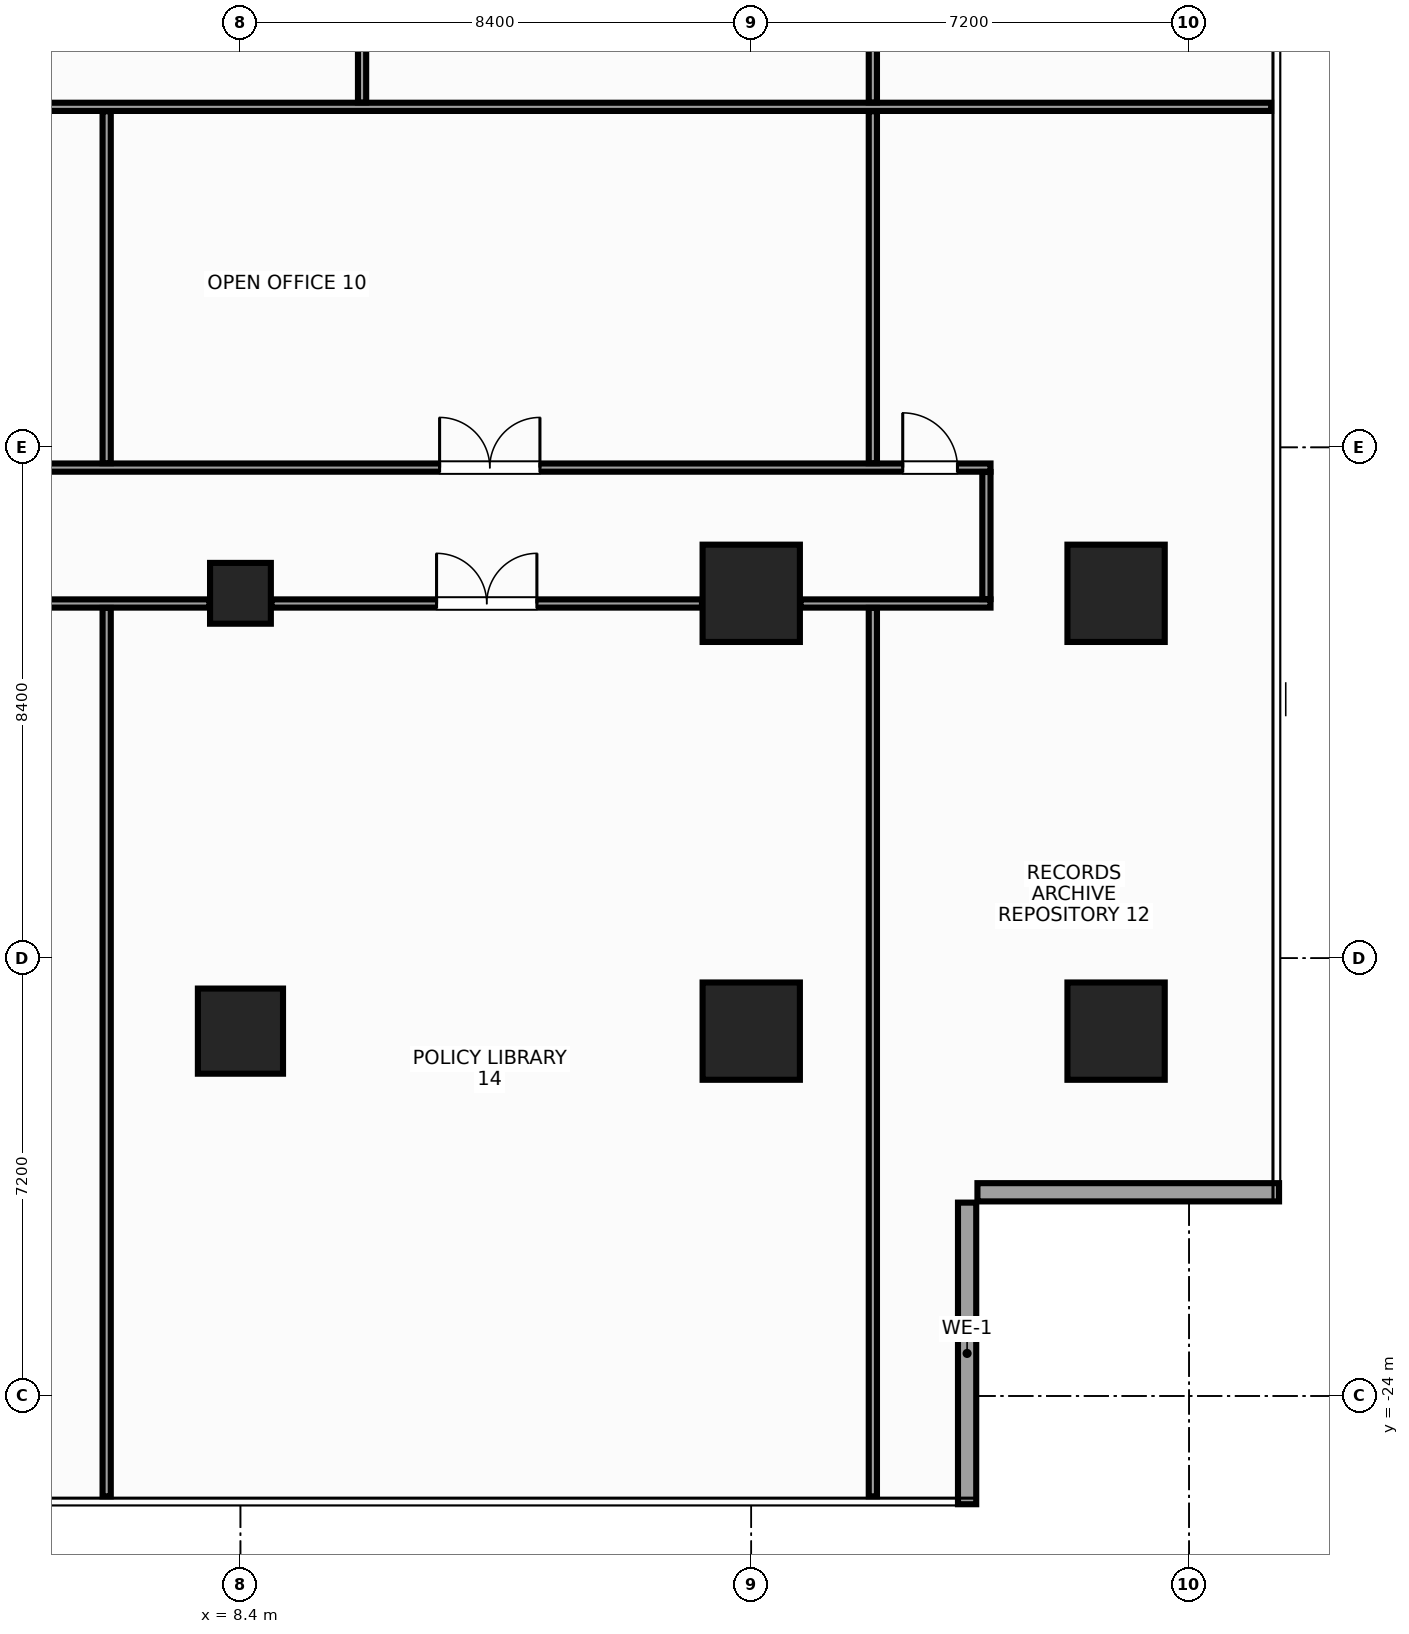
"""IFC4 building model, lengths in metres.
Left out: names, types, materials, properties, quantities, classifications, styles, units other than length and angle.
Written with IfcOpenShell. Run it as: python <this file> out.ifc"""

import sys

from ifc_helpers import new_model, si_unit, direction, frame, frame_2d, origin, origin_2d, place, context, subcontext, project, spatial, rectangle, hollow_rectangle, extrude, source, transform, mapped, element, fill, save


model = new_model("IFC4")
c1 = context("Model", 3, precision=1e-05, world=origin(), true_north=direction((0.0, 1.0)))
c2 = subcontext(c1, "Body", "Model", "MODEL_VIEW")
j1 = project(units=[si_unit("LENGTHUNIT", "METRE"), si_unit("PLANEANGLEUNIT", "RADIAN")], contexts=[c1])
p1 = place(None, origin())
s1 = spatial("IfcSite", under=j1, at=p1, CompositionType="ELEMENT")
p2 = place(p1, origin())
s2 = spatial("IfcBuilding", under=s1, at=p2, CompositionType="ELEMENT")
p3 = place(p2, frame((0.0, 0.0, 77.6)))
s3 = spatial("IfcBuildingStorey", under=s2, at=p3, CompositionType="ELEMENT", Elevation=77.6)
m1 = source(origin(), c2, "Body", "SweptSolid", [
    extrude(rectangle(XDim=1.6, YDim=1.6, at=origin_2d()), origin(), (0.0, 0.0, 1.0), 3.6),
])
for number, where, z_axis, x_axis in (
    (1, (16.8, -18.0, 0.0), (0.0, 0.0, 1.0), (1.0, 0.0, 0.0)),
    (2, (16.8, -10.8, 0.0), (0.0, 0.0, 1.0), (1.0, 0.0, 0.0)),
    (3, (22.8, -18.0, 0.0), (0.0, 0.0, 1.0), (1.0, 0.0, 0.0)),
    (4, (22.8, -10.8, 0.0), (0.0, 0.0, 1.0), (1.0, 0.0, 0.0)),
):
    element("IfcColumn", number, at=place(p3, frame(where, z_axis=z_axis, x_axis=x_axis)), inside=s3, PredefinedType="COLUMN", context=c2, shape_type="MappedRepresentation", body=[
        mapped(m1, transform((0.0, 0.0, 0.0), x_axis=(1.0, 0.0, 0.0), y_axis=(0.0, 1.0, 0.0), z_axis=(0.0, 0.0, 1.0), scale=1.0)),
    ])
m2 = source(origin(), c2, "Body", "SweptSolid", [
    extrude(rectangle(XDim=1.4, YDim=1.4, at=origin_2d()), origin(), (0.0, 0.0, 1.0), 3.6),
])
p4 = place(p3, frame((8.4, -18.0, 0.0), z_axis=(0.0, 0.0, 1.0), x_axis=(1.0, 0.0, 0.0)))
e5 = element("IfcColumn", 5, at=p4, inside=s3, PredefinedType="COLUMN", context=c2, shape_type="MappedRepresentation", body=[
    mapped(m2, transform((0.0, 0.0, 0.0), x_axis=(1.0, 0.0, 0.0), y_axis=(0.0, 1.0, 0.0), z_axis=(0.0, 0.0, 1.0), scale=1.0)),
])
m3 = source(origin(), c2, "Body", "SweptSolid", [
    extrude(hollow_rectangle(XDim=1.0, YDim=1.0, WallThickness=0.045, at=origin_2d()), origin(), (0.0, 0.0, 1.0), 3.6),
])
p5 = place(p3, frame((8.4, -10.8, 0.0), z_axis=(0.0, 0.0, 1.0), x_axis=(1.0, 0.0, 0.0)))
e6 = element("IfcColumn", 6, at=p5, inside=s3, PredefinedType="COLUMN", context=c2, shape_type="MappedRepresentation", body=[
    mapped(m3, transform((0.0, 0.0, 0.0), x_axis=(1.0, 0.0, 0.0), y_axis=(0.0, 1.0, 0.0), z_axis=(0.0, 0.0, 1.0), scale=1.0)),
])
m4 = source(origin(), c2, "Body", "SweptSolid", [
    extrude(rectangle(XDim=4.96, YDim=0.3, at=frame_2d((2.48, 0.0))), origin(), (0.0, 0.0, 1.0), 2.74),
])
for number, where, z_axis, x_axis in (
    (7, (20.35, -25.78, 0.0), (0.0, 0.0, 1.0), (0.0, 1.0, 0.0)),
    (8, (20.52, -20.65, 0.0), (0.0, 0.0, 1.0), (1.0, 0.0, 0.0)),
):
    element("IfcWall", number, at=place(p3, frame(where, z_axis=z_axis, x_axis=x_axis)), inside=s3, PredefinedType="STANDARD", context=c2, shape_type="MappedRepresentation", body=[
        mapped(m4, transform((0.0, 0.0, 0.0), x_axis=(1.0, 0.0, 0.0), y_axis=(0.0, 1.0, 0.0), z_axis=(0.0, 0.0, 1.0), scale=1.0)),
    ])
m5 = source(origin(), c2, "Body", "SweptSolid", [
    extrude(rectangle(XDim=22.3, YDim=0.135, at=frame_2d((11.15, 0.0))), origin(), (0.0, 0.0, 1.0), 2.745),
])
p6 = place(p3, frame((-1.565, -8.732, 0.0), z_axis=(0.0, 0.0, 1.0), x_axis=(1.0, 0.0, 0.0)))
e9 = element("IfcWall", 9, at=p6, inside=s3, PredefinedType="PARTITIONING", context=c2, shape_type="MappedRepresentation", body=[
    mapped(m5, transform((0.0, 0.0, 0.0), x_axis=(1.0, 0.0, 0.0), y_axis=(0.0, 1.0, 0.0), z_axis=(0.0, 0.0, 1.0), scale=1.0)),
])
p7 = place(p6, frame((3.524, 0.0, 0.0)))
e10 = element("IfcOpeningElement", 10, at=p7, cuts=e9, PredefinedType="OPENING", context=c2, shape_type="SweptSolid", body=[
    extrude(rectangle(XDim=1.65, YDim=2.35, at=frame_2d((0.825, 1.175))), frame((0.0, 0.08, 0.0), z_axis=(0.0, -1.0, 0.0), x_axis=(1.0, 0.0, 0.0)), (0.0, 0.0, 1.0), 0.159),
])
p8 = place(p6, frame((13.24, 0.0, 0.0)))
e11 = element("IfcOpeningElement", 11, at=p8, cuts=e9, PredefinedType="OPENING", context=c2, shape_type="SweptSolid", body=[
    extrude(rectangle(XDim=1.65, YDim=2.35, at=frame_2d((0.825, 1.175))), frame((0.0, 0.08, 0.0), z_axis=(0.0, -1.0, 0.0), x_axis=(1.0, 0.0, 0.0)), (0.0, 0.0, 1.0), 0.159),
])
p9 = place(p6, frame((20.856, 0.0, 0.0)))
e12 = element("IfcOpeningElement", 12, at=p9, cuts=e9, PredefinedType="OPENING", context=c2, shape_type="SweptSolid", body=[
    extrude(rectangle(XDim=0.9, YDim=2.15, at=frame_2d((0.45, 1.075))), frame((0.0, 0.08, 0.0), z_axis=(0.0, -1.0, 0.0), x_axis=(1.0, 0.0, 0.0)), (0.0, 0.0, 1.0), 0.159),
])
m6 = source(origin(), c2, "Body", "SweptSolid", [
    extrude(rectangle(XDim=7.38, YDim=0.135, at=frame_2d((3.69, 0.0))), origin(), (0.0, 0.0, 1.0), 2.745),
])
p10 = place(p3, frame((0.51, -10.968, 0.0), z_axis=(0.0, 0.0, 1.0), x_axis=(1.0, 0.0, 0.0)))
e13 = element("IfcWall", 13, at=p10, inside=s3, PredefinedType="PARTITIONING", context=c2, shape_type="MappedRepresentation", body=[
    mapped(m6, transform((0.0, 0.0, 0.0), x_axis=(1.0, 0.0, 0.0), y_axis=(0.0, 1.0, 0.0), z_axis=(0.0, 0.0, 1.0), scale=1.0)),
])
m7 = source(origin(), c2, "Body", "SweptSolid", [
    extrude(rectangle(XDim=7.08, YDim=0.135, at=frame_2d((3.54, 0.0))), origin(), (0.0, 0.0, 1.0), 2.745),
])
p11 = place(p3, frame((8.91, -10.968, 0.0), z_axis=(0.0, 0.0, 1.0), x_axis=(1.0, 0.0, 0.0)))
e14 = element("IfcWall", 14, at=p11, inside=s3, PredefinedType="PARTITIONING", context=c2, shape_type="MappedRepresentation", body=[
    mapped(m7, transform((0.0, 0.0, 0.0), x_axis=(1.0, 0.0, 0.0), y_axis=(0.0, 1.0, 0.0), z_axis=(0.0, 0.0, 1.0), scale=1.0)),
])
p12 = place(p11, frame((2.715, 0.0, 0.0)))
e15 = element("IfcOpeningElement", 15, at=p12, cuts=e14, PredefinedType="OPENING", context=c2, shape_type="SweptSolid", body=[
    extrude(rectangle(XDim=1.65, YDim=2.35, at=frame_2d((0.825, 1.175))), frame((0.0, 0.08, 0.0), z_axis=(0.0, -1.0, 0.0), x_axis=(1.0, 0.0, 0.0)), (0.0, 0.0, 1.0), 0.159),
])
m8 = source(origin(), c2, "Body", "SweptSolid", [
    extrude(rectangle(XDim=3.125, YDim=0.135, at=frame_2d((1.562, 0.0))), origin(), (0.0, 0.0, 1.0), 2.745),
])
p13 = place(p3, frame((17.61, -10.968, 0.0), z_axis=(0.0, 0.0, 1.0), x_axis=(1.0, 0.0, 0.0)))
e16 = element("IfcWall", 16, at=p13, inside=s3, PredefinedType="PARTITIONING", context=c2, shape_type="MappedRepresentation", body=[
    mapped(m8, transform((0.0, 0.0, 0.0), x_axis=(1.0, 0.0, 0.0), y_axis=(0.0, 1.0, 0.0), z_axis=(0.0, 0.0, 1.0), scale=1.0)),
])
m9 = source(origin(), c2, "Body", "SweptSolid", [
    extrude(rectangle(XDim=2.09, YDim=0.135, at=frame_2d((1.045, 0.0))), origin(), (0.0, 0.0, 1.0), 3.36),
])
p14 = place(p3, frame((20.667, -10.895, 0.0), z_axis=(0.0, 0.0, 1.0), x_axis=(0.0, 1.0, 0.0)))
e17 = element("IfcWall", 17, at=p14, inside=s3, PredefinedType="PARTITIONING", context=c2, shape_type="MappedRepresentation", body=[
    mapped(m9, transform((0.0, 0.0, 0.0), x_axis=(1.0, 0.0, 0.0), y_axis=(0.0, 1.0, 0.0), z_axis=(0.0, 0.0, 1.0), scale=1.0)),
])
m10 = source(origin(), c2, "Body", "SweptSolid", [
    extrude(rectangle(XDim=26.91, YDim=0.135, at=frame_2d((13.455, 0.0))), origin(), (0.0, 0.0, 1.0), 2.745),
])
p15 = place(p3, frame((-1.56, -2.8, 0.0), z_axis=(0.0, 0.0, 1.0), x_axis=(1.0, 0.0, 0.0)))
e18 = element("IfcWall", 18, at=p15, inside=s3, PredefinedType="PARTITIONING", context=c2, shape_type="MappedRepresentation", body=[
    mapped(m10, transform((0.0, 0.0, 0.0), x_axis=(1.0, 0.0, 0.0), y_axis=(0.0, 1.0, 0.0), z_axis=(0.0, 0.0, 1.0), scale=1.0)),
])
m11 = source(origin(), c2, "Body", "SweptSolid", [
    extrude(rectangle(XDim=10.387, YDim=0.135, at=frame_2d((5.194, 0.0))), origin(), (0.0, 0.0, 1.0), 2.645),
])
p16 = place(p3, frame((10.4, -2.728, 0.0), z_axis=(0.0, 0.0, 1.0), x_axis=(0.0, 1.0, 0.0)))
e19 = element("IfcWall", 19, at=p16, inside=s3, PredefinedType="PARTITIONING", context=c2, shape_type="MappedRepresentation", body=[
    mapped(m11, transform((0.0, 0.0, 0.0), x_axis=(1.0, 0.0, 0.0), y_axis=(0.0, 1.0, 0.0), z_axis=(0.0, 0.0, 1.0), scale=1.0)),
])
m12 = source(origin(), c2, "Body", "SweptSolid", [
    extrude(rectangle(XDim=10.387, YDim=0.135, at=frame_2d((5.194, 0.0))), origin(), (0.0, 0.0, 1.0), 2.745),
])
p17 = place(p3, frame((18.8, -2.728, 0.0), z_axis=(0.0, 0.0, 1.0), x_axis=(0.0, 1.0, 0.0)))
e20 = element("IfcWall", 20, at=p17, inside=s3, PredefinedType="PARTITIONING", context=c2, shape_type="MappedRepresentation", body=[
    mapped(m12, transform((0.0, 0.0, 0.0), x_axis=(1.0, 0.0, 0.0), y_axis=(0.0, 1.0, 0.0), z_axis=(0.0, 0.0, 1.0), scale=1.0)),
])
m13 = source(origin(), c2, "Body", "SweptSolid", [
    extrude(rectangle(XDim=14.61, YDim=0.135, at=frame_2d((7.305, 0.0))), origin(), (0.0, 0.0, 1.0), 2.745),
])
p18 = place(p3, frame((6.2, -25.65, 0.0), z_axis=(0.0, 0.0, 1.0), x_axis=(0.0, 1.0, 0.0)))
e21 = element("IfcWall", 21, at=p18, inside=s3, PredefinedType="PARTITIONING", context=c2, shape_type="MappedRepresentation", body=[
    mapped(m13, transform((0.0, 0.0, 0.0), x_axis=(1.0, 0.0, 0.0), y_axis=(0.0, 1.0, 0.0), z_axis=(0.0, 0.0, 1.0), scale=1.0)),
])
m14 = source(origin(), c2, "Body", "SweptSolid", [
    extrude(rectangle(XDim=5.787, YDim=0.135, at=frame_2d((2.894, 0.0))), origin(), (0.0, 0.0, 1.0), 3.36),
])
p19 = place(p3, frame((6.2, -8.66, 0.0), z_axis=(0.0, 0.0, 1.0), x_axis=(0.0, 1.0, 0.0)))
e22 = element("IfcWall", 22, at=p19, inside=s3, PredefinedType="PARTITIONING", context=c2, shape_type="MappedRepresentation", body=[
    mapped(m14, transform((0.0, 0.0, 0.0), x_axis=(1.0, 0.0, 0.0), y_axis=(0.0, 1.0, 0.0), z_axis=(0.0, 0.0, 1.0), scale=1.0)),
])
p20 = place(p3, frame((18.8, -25.65, 0.0), z_axis=(0.0, 0.0, 1.0), x_axis=(0.0, 1.0, 0.0)))
e23 = element("IfcWall", 23, at=p20, inside=s3, PredefinedType="PARTITIONING", context=c2, shape_type="MappedRepresentation", body=[
    mapped(m13, transform((0.0, 0.0, 0.0), x_axis=(1.0, 0.0, 0.0), y_axis=(0.0, 1.0, 0.0), z_axis=(0.0, 0.0, 1.0), scale=1.0)),
])
p21 = place(p3, frame((18.8, -8.66, 0.0), z_axis=(0.0, 0.0, 1.0), x_axis=(0.0, 1.0, 0.0)))
e24 = element("IfcWall", 24, at=p21, inside=s3, PredefinedType="PARTITIONING", context=c2, shape_type="MappedRepresentation", body=[
    mapped(m14, transform((0.0, 0.0, 0.0), x_axis=(1.0, 0.0, 0.0), y_axis=(0.0, 1.0, 0.0), z_axis=(0.0, 0.0, 1.0), scale=1.0)),
])
m15 = source(origin(), c2, "Body", "SweptSolid", [
    extrude(rectangle(XDim=1.65, YDim=2.35, at=frame_2d((0.825, 1.175))), frame((0.0, 0.025, 0.0), z_axis=(0.0, -1.0, 0.0), x_axis=(1.0, 0.0, 0.0)), (0.0, 0.0, 1.0), 0.05),
])
p22 = place(p8, origin())
e25 = element("IfcDoor", 25, at=p22, inside=s3, OperationType="DOUBLE_DOOR_SINGLE_SWING", PredefinedType="DOOR", context=c2, shape_type="MappedRepresentation", body=[
    mapped(m15, transform((0.0, 0.0, 0.0), x_axis=(1.0, 0.0, 0.0), y_axis=(0.0, 1.0, 0.0), z_axis=(0.0, 0.0, 1.0), scale=1.0)),
])
fill(e11, e25)
m16 = source(origin(), c2, "Body", "SweptSolid", [
    extrude(rectangle(XDim=0.9, YDim=2.15, at=frame_2d((0.45, 1.075))), frame((0.0, 0.025, 0.0), z_axis=(0.0, -1.0, 0.0), x_axis=(1.0, 0.0, 0.0)), (0.0, 0.0, 1.0), 0.05),
])
p23 = place(p9, origin())
e26 = element("IfcDoor", 26, at=p23, inside=s3, OperationType="SINGLE_SWING_LEFT", PredefinedType="DOOR", context=c2, shape_type="MappedRepresentation", body=[
    mapped(m16, transform((0.0, 0.0, 0.0), x_axis=(1.0, 0.0, 0.0), y_axis=(0.0, 1.0, 0.0), z_axis=(0.0, 0.0, 1.0), scale=1.0)),
])
fill(e12, e26)
p24 = place(p12, origin())
e27 = element("IfcDoor", 27, at=p24, inside=s3, OperationType="DOUBLE_DOOR_SINGLE_SWING", PredefinedType="DOOR", context=c2, shape_type="MappedRepresentation", body=[
    mapped(m15, transform((0.0, 0.0, 0.0), x_axis=(1.0, 0.0, 0.0), y_axis=(0.0, 1.0, 0.0), z_axis=(0.0, 0.0, 1.0), scale=1.0)),
])
fill(e15, e27)
save(model, sys.argv[1])
